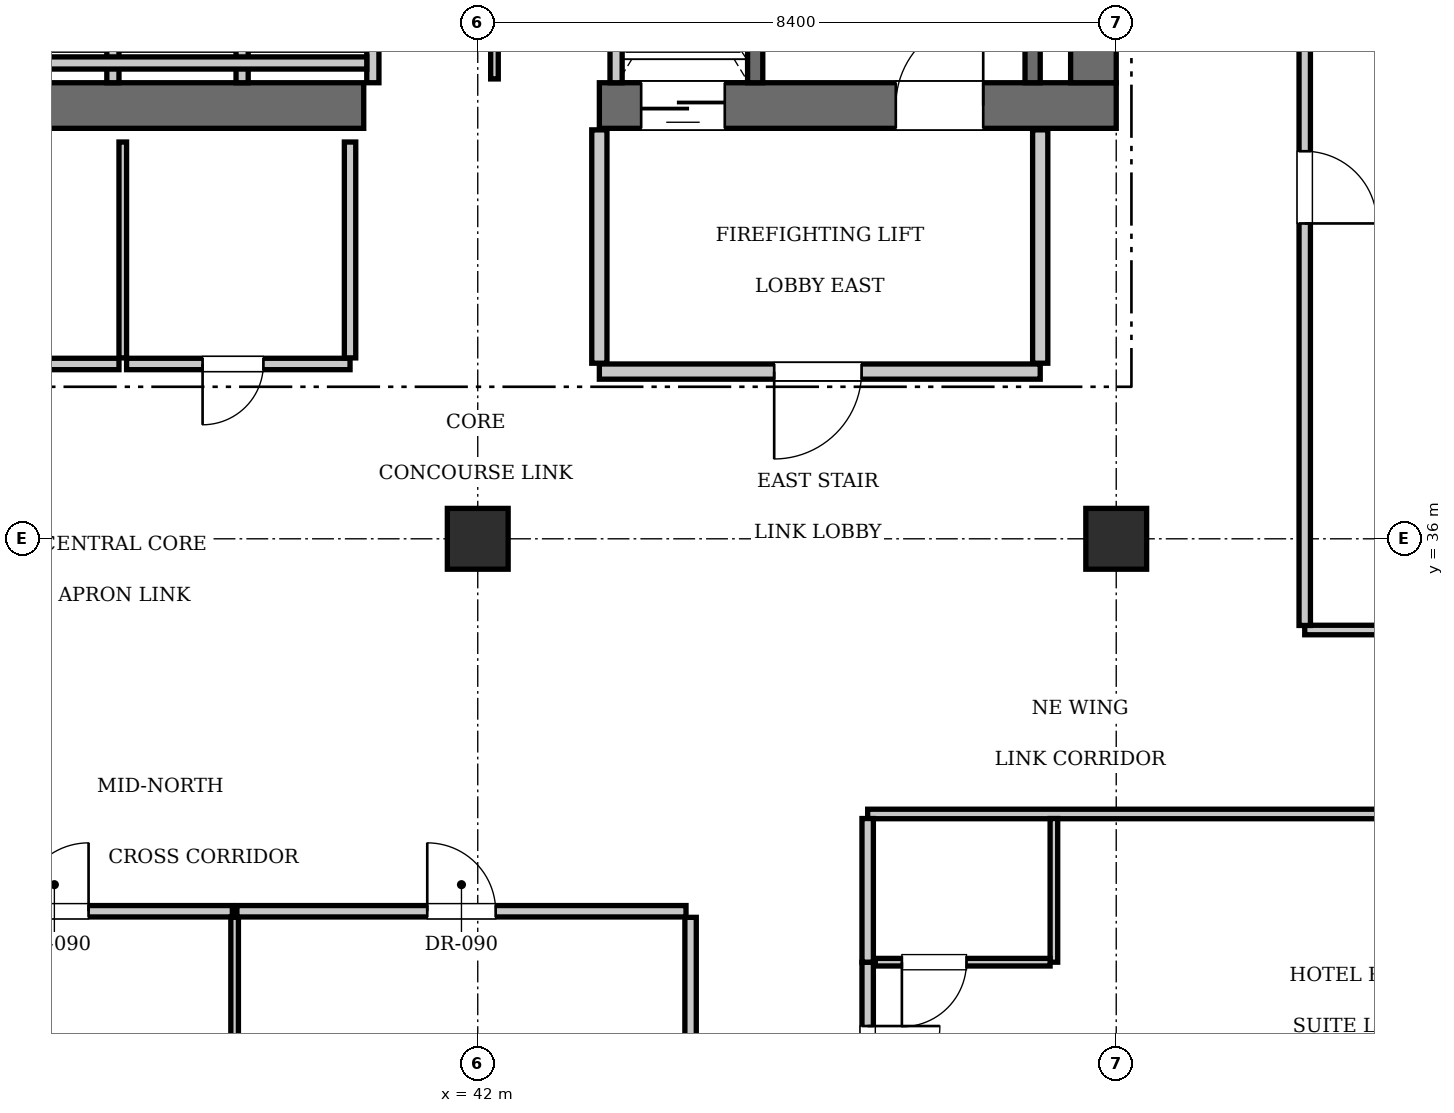
"""IFC4 building model, lengths in metres.
Left out: names, types, materials, properties, quantities, classifications, styles, units other than length and angle.
Written with IfcOpenShell. Run it as: python <this file> out.ifc"""

import sys

from ifc_helpers import new_model, si_unit, direction, frame, frame_2d, origin, origin_2d, place, context, subcontext, project, spatial, rectangle, extrude, element, fill, save


model = new_model("IFC4")
c1 = context("Model", 3, precision=1e-05, world=origin(), true_north=direction((0.0, 1.0)))
c2 = subcontext(c1, "Body", "Model", "MODEL_VIEW")
j1 = project(units=[si_unit("LENGTHUNIT", "METRE"), si_unit("PLANEANGLEUNIT", "RADIAN")], contexts=[c1])
p1 = place(None, origin())
s1 = spatial("IfcSite", under=j1, at=p1, CompositionType="ELEMENT")
p2 = place(p1, origin())
s2 = spatial("IfcBuilding", under=s1, at=p2, CompositionType="ELEMENT")
p3 = place(p2, frame((0.0, 0.0, 277.9)))
s3 = spatial("IfcBuildingStorey", under=s2, at=p3, CompositionType="ELEMENT", Elevation=277.9)
p4 = place(p3, frame((35.1, 41.7, 0.0), z_axis=(0.0, 0.0, 1.0), x_axis=(1.0, 0.0, 0.0)))
e1 = element("IfcWall", 1, at=p4, inside=s3, PredefinedType="SHEAR", context=c2, shape_type="SweptSolid", body=[
    extrude(rectangle(XDim=5.4, YDim=0.6, at=frame_2d((2.7, 0.0))), origin(), (0.0, 0.0, 1.0), 3.85),
])
p5 = place(p3, frame((43.6, 41.7, 0.0), z_axis=(0.0, 0.0, 1.0), x_axis=(1.0, 0.0, 0.0)))
e2 = element("IfcWall", 2, at=p5, inside=s3, PredefinedType="SHEAR", context=c2, shape_type="SweptSolid", body=[
    extrude(rectangle(XDim=6.8, YDim=0.6, at=frame_2d((3.4, 0.0))), origin(), (0.0, 0.0, 1.0), 3.85),
])
p6 = place(p5, frame((3.9, 0.0, 0.0)))
e3 = element("IfcOpeningElement", 3, at=p6, cuts=e2, PredefinedType="OPENING", context=c2, shape_type="SweptSolid", body=[
    extrude(rectangle(XDim=1.15, YDim=2.15, at=frame_2d((0.575, 1.075))), frame((0.0, 0.31, 0.0), z_axis=(0.0, -1.0, 0.0), x_axis=(1.0, 0.0, 0.0)), (0.0, 0.0, 1.0), 0.62),
])
p7 = place(p5, frame((0.55, 0.0, 0.0)))
e4 = element("IfcOpeningElement", 4, at=p7, cuts=e2, PredefinedType="OPENING", context=c2, shape_type="SweptSolid", body=[
    extrude(rectangle(XDim=1.1, YDim=2.2, at=frame_2d((0.55, 1.1))), frame((0.0, 0.31, 0.0), z_axis=(0.0, -1.0, 0.0), x_axis=(1.0, 0.0, 0.0)), (0.0, 0.0, 1.0), 0.62),
])
p8 = place(p3, frame((50.1, 42.0, 0.0), z_axis=(0.0, 0.0, 1.0), x_axis=(0.0, 1.0, 0.0)))
e5 = element("IfcWall", 5, at=p8, inside=s3, PredefinedType="SHEAR", context=c2, shape_type="SweptSolid", body=[
    extrude(rectangle(XDim=2.2, YDim=0.6, at=frame_2d((1.1, 0.0))), origin(), (0.0, 0.0, 1.0), 3.85),
])
for number, where, z_axis, x_axis in (
    (6, (42.0, 36.0, 0.0), (0.0, 0.0, 1.0), (1.0, 0.0, 0.0)),
    (7, (50.4, 36.0, 0.0), (0.0, 0.0, 1.0), (1.0, 0.0, 0.0)),
):
    element("IfcColumn", number, at=place(p3, frame(where, z_axis=z_axis, x_axis=x_axis)), inside=s3, PredefinedType="COLUMN", context=c2, shape_type="SweptSolid", body=[
        extrude(rectangle(XDim=0.8, YDim=0.8, at=origin_2d()), origin(), (0.0, 0.0, 1.0), 3.85),
    ])
p9 = place(p3, frame((45.65, 42.0, 0.0), z_axis=(0.0, 0.0, 1.0), x_axis=(0.0, 1.0, 0.0)))
e8 = element("IfcWall", 8, at=p9, inside=s3, PredefinedType="SOLIDWALL", context=c2, shape_type="SweptSolid", body=[
    extrude(rectangle(XDim=9.15, YDim=0.2, at=frame_2d((4.575, 0.0))), origin(), (0.0, 0.0, 1.0), 3.61),
])
p10 = place(p3, frame((49.3, 42.0, 0.0), z_axis=(0.0, 0.0, 1.0), x_axis=(0.0, 1.0, 0.0)))
e9 = element("IfcWall", 9, at=p10, inside=s3, PredefinedType="SOLIDWALL", context=c2, shape_type="SweptSolid", body=[
    extrude(rectangle(XDim=9.12, YDim=0.2, at=frame_2d((4.56, 0.0))), origin(), (0.0, 0.0, 1.0), 3.61),
])
p11 = place(p3, frame((43.82, 42.0, 0.0), z_axis=(0.0, 0.0, 1.0), x_axis=(0.0, 1.0, 0.0)))
e10 = element("IfcWall", 10, at=p11, inside=s3, PredefinedType="SOLIDWALL", context=c2, shape_type="SweptSolid", body=[
    extrude(rectangle(XDim=2.74, YDim=0.16, at=frame_2d((1.37, 0.0))), origin(), (0.0, 0.0, 1.0), 3.61),
])
for number, where, z_axis, x_axis in (
    (11, (37.2, 42.0, 0.0), (0.0, 0.0, 1.0), (0.0, 1.0, 0.0)),
    (12, (38.9, 42.0, 0.0), (0.0, 0.0, 1.0), (0.0, 1.0, 0.0)),
    (13, (40.62, 42.0, 0.0), (0.0, 0.0, 1.0), (0.0, 1.0, 0.0)),
):
    element("IfcWall", number, at=place(p3, frame(where, z_axis=z_axis, x_axis=x_axis)), inside=s3, PredefinedType="SOLIDWALL", context=c2, shape_type="SweptSolid", body=[
        extrude(rectangle(XDim=2.35, YDim=0.16, at=frame_2d((1.175, 0.0))), origin(), (0.0, 0.0, 1.0), 3.61),
    ])
p12 = place(p3, frame((35.52, 42.26, 0.0), z_axis=(0.0, 0.0, 1.0), x_axis=(1.0, 0.0, 0.0)))
e14 = element("IfcWall", 14, at=p12, inside=s3, PredefinedType="SOLIDWALL", context=c2, shape_type="SweptSolid", body=[
    extrude(rectangle(XDim=5.02, YDim=0.16, at=frame_2d((2.51, 0.0))), origin(), (0.0, 0.0, 1.0), 3.61),
])
p13 = place(p3, frame((43.6, 38.2, 0.0), z_axis=(0.0, 0.0, 1.0), x_axis=(1.0, 0.0, 0.0)))
e15 = element("IfcWall", 15, at=p13, inside=s3, PredefinedType="PARTITIONING", context=c2, shape_type="SweptSolid", body=[
    extrude(rectangle(XDim=5.8, YDim=0.2, at=frame_2d((2.9, 0.0))), origin(), (0.0, 0.0, 1.0), 3.61),
])
p14 = place(p13, frame((2.3, 0.0, 0.0)))
e16 = element("IfcOpeningElement", 16, at=p14, cuts=e15, PredefinedType="OPENING", context=c2, shape_type="SweptSolid", body=[
    extrude(rectangle(XDim=1.15, YDim=2.15, at=frame_2d((0.575, 1.075))), frame((0.0, 0.11, 0.0), z_axis=(0.0, -1.0, 0.0), x_axis=(1.0, 0.0, 0.0)), (0.0, 0.0, 1.0), 0.22),
])
for number, where, z_axis, x_axis in (
    (17, (43.6, 38.31, 0.0), (0.0, 0.0, 1.0), (0.0, 1.0, 0.0)),
    (18, (49.4, 38.31, 0.0), (0.0, 0.0, 1.0), (0.0, 1.0, 0.0)),
):
    element("IfcWall", number, at=place(p3, frame(where, z_axis=z_axis, x_axis=x_axis)), inside=s3, PredefinedType="PARTITIONING", context=c2, shape_type="SweptSolid", body=[
        extrude(rectangle(XDim=3.07, YDim=0.2, at=frame_2d((1.535, 0.0))), origin(), (0.0, 0.0, 1.0), 3.61),
    ])
p15 = place(p3, frame((42.22, 42.05, 0.0), z_axis=(0.0, 0.0, 1.0), x_axis=(0.0, 1.0, 0.0)))
e19 = element("IfcWall", 19, at=p15, inside=s3, PredefinedType="PARTITIONING", context=c2, shape_type="SweptSolid", body=[
    extrude(rectangle(XDim=2.91, YDim=0.1, at=frame_2d((1.455, 0.0))), origin(), (0.0, 0.0, 1.0), 3.61),
])
p16 = place(p15, frame((0.65, 0.0, 0.0)))
e20 = element("IfcOpeningElement", 20, at=p16, cuts=e19, PredefinedType="OPENING", context=c2, shape_type="SweptSolid", body=[
    extrude(rectangle(XDim=0.8, YDim=2.05, at=frame_2d((0.4, 1.025))), frame((0.0, 0.06, 0.0), z_axis=(0.0, -1.0, 0.0), x_axis=(1.0, 0.0, 0.0)), (0.0, 0.0, 1.0), 0.12),
])
p17 = place(p3, frame((34.4, 38.3, 0.0), z_axis=(0.0, 0.0, 1.0), x_axis=(1.0, 0.0, 0.0)))
e21 = element("IfcWall", 21, at=p17, inside=s3, PredefinedType="PARTITIONING", context=c2, shape_type="SweptSolid", body=[
    extrude(rectangle(XDim=2.88, YDim=0.15, at=frame_2d((1.44, 0.0))), origin(), (0.0, 0.0, 1.0), 3.61),
])
p18 = place(p17, frame((1.0, 0.0, 0.0)))
e22 = element("IfcOpeningElement", 22, at=p18, cuts=e21, PredefinedType="OPENING", context=c2, shape_type="SweptSolid", body=[
    extrude(rectangle(XDim=0.8, YDim=2.05, at=frame_2d((0.4, 1.025))), frame((0.0, 0.085, 0.0), z_axis=(0.0, -1.0, 0.0), x_axis=(1.0, 0.0, 0.0)), (0.0, 0.0, 1.0), 0.17),
])
p19 = place(p3, frame((37.38, 38.3, 0.0), z_axis=(0.0, 0.0, 1.0), x_axis=(1.0, 0.0, 0.0)))
e23 = element("IfcWall", 23, at=p19, inside=s3, PredefinedType="PARTITIONING", context=c2, shape_type="SweptSolid", body=[
    extrude(rectangle(XDim=2.94, YDim=0.15, at=frame_2d((1.47, 0.0))), origin(), (0.0, 0.0, 1.0), 3.61),
])
p20 = place(p19, frame((1.0, 0.0, 0.0)))
e24 = element("IfcOpeningElement", 24, at=p20, cuts=e23, PredefinedType="OPENING", context=c2, shape_type="SweptSolid", body=[
    extrude(rectangle(XDim=0.8, YDim=2.05, at=frame_2d((0.4, 1.025))), frame((0.0, 0.085, 0.0), z_axis=(0.0, -1.0, 0.0), x_axis=(1.0, 0.0, 0.0)), (0.0, 0.0, 1.0), 0.17),
])
p21 = place(p3, frame((37.33, 38.38, 0.0), z_axis=(0.0, 0.0, 1.0), x_axis=(0.0, 1.0, 0.0)))
e25 = element("IfcWall", 25, at=p21, inside=s3, PredefinedType="PARTITIONING", context=c2, shape_type="SweptSolid", body=[
    extrude(rectangle(XDim=2.84, YDim=0.1, at=frame_2d((1.42, 0.0))), origin(), (0.0, 0.0, 1.0), 3.61),
])
p22 = place(p3, frame((40.32, 38.38, 0.0), z_axis=(0.0, 0.0, 1.0), x_axis=(0.0, 1.0, 0.0)))
e26 = element("IfcWall", 26, at=p22, inside=s3, PredefinedType="PARTITIONING", context=c2, shape_type="SweptSolid", body=[
    extrude(rectangle(XDim=2.84, YDim=0.15, at=frame_2d((1.42, 0.0))), origin(), (0.0, 0.0, 1.0), 3.61),
])
p23 = place(p3, frame((44.8, 23.13, 0.0), z_axis=(0.0, 0.0, 1.0), x_axis=(0.0, 1.0, 0.0)))
e27 = element("IfcWall", 27, at=p23, inside=s3, PredefinedType="PARTITIONING", context=c2, shape_type="SweptSolid", body=[
    extrude(rectangle(XDim=7.89, YDim=0.15, at=frame_2d((3.945, 0.0))), origin(), (0.0, 0.0, 1.0), 3.61),
])
p24 = place(p3, frame((34.088, 31.1, 0.0), z_axis=(0.0, 0.0, 1.0), x_axis=(1.0, 0.0, 0.0)))
e28 = element("IfcWall", 28, at=p24, inside=s3, PredefinedType="PARTITIONING", context=c2, shape_type="SweptSolid", body=[
    extrude(rectangle(XDim=4.683, YDim=0.15, at=frame_2d((2.342, 0.0))), origin(), (0.0, 0.0, 1.0), 3.61),
])
p25 = place(p24, frame((1.892, 0.0, 0.0)))
e29 = element("IfcOpeningElement", 29, at=p25, cuts=e28, PredefinedType="OPENING", context=c2, shape_type="SweptSolid", body=[
    extrude(rectangle(XDim=0.9, YDim=2.1, at=frame_2d((0.45, 1.05))), frame((0.0, 0.085, 0.0), z_axis=(0.0, -1.0, 0.0), x_axis=(1.0, 0.0, 0.0)), (0.0, 0.0, 1.0), 0.17),
])
p26 = place(p3, frame((38.802, 23.13, 0.0), z_axis=(0.0, 0.0, 1.0), x_axis=(0.0, 1.0, 0.0)))
e30 = element("IfcWall", 30, at=p26, inside=s3, PredefinedType="PARTITIONING", context=c2, shape_type="SweptSolid", body=[
    extrude(rectangle(XDim=7.89, YDim=0.1, at=frame_2d((3.945, 0.0))), origin(), (0.0, 0.0, 1.0), 3.61),
])
p27 = place(p3, frame((38.832, 31.1, 0.0), z_axis=(0.0, 0.0, 1.0), x_axis=(1.0, 0.0, 0.0)))
e31 = element("IfcWall", 31, at=p27, inside=s3, PredefinedType="PARTITIONING", context=c2, shape_type="SweptSolid", body=[
    extrude(rectangle(XDim=5.908, YDim=0.15, at=frame_2d((2.954, 0.0))), origin(), (0.0, 0.0, 1.0), 3.61),
])
p28 = place(p27, frame((2.504, 0.0, 0.0)))
e32 = element("IfcOpeningElement", 32, at=p28, cuts=e31, PredefinedType="OPENING", context=c2, shape_type="SweptSolid", body=[
    extrude(rectangle(XDim=0.9, YDim=2.1, at=frame_2d((0.45, 1.05))), frame((0.0, 0.085, 0.0), z_axis=(0.0, -1.0, 0.0), x_axis=(1.0, 0.0, 0.0)), (0.0, 0.0, 1.0), 0.17),
])
p29 = place(p3, frame((47.13, 32.38, 0.0), z_axis=(0.0, 0.0, 1.0), x_axis=(1.0, 0.0, 0.0)))
e33 = element("IfcWall", 33, at=p29, inside=s3, PredefinedType="PARTITIONING", context=c2, shape_type="SweptSolid", body=[
    extrude(rectangle(XDim=12.97, YDim=0.125, at=frame_2d((6.485, 0.0))), origin(), (0.0, 0.0, 1.0), 3.61),
])
p30 = place(p3, frame((47.13, 27.8, 0.0), z_axis=(0.0, 0.0, 1.0), x_axis=(0.0, 1.0, 0.0)))
e34 = element("IfcWall", 34, at=p30, inside=s3, PredefinedType="PARTITIONING", context=c2, shape_type="SweptSolid", body=[
    extrude(rectangle(XDim=2.63, YDim=0.15, at=frame_2d((1.315, 0.0))), origin(), (0.0, 0.0, 1.0), 3.61),
])
p31 = place(p30, frame((0.84, 0.0, 0.0)))
e35 = element("IfcOpeningElement", 35, at=p31, cuts=e34, PredefinedType="OPENING", context=c2, shape_type="SweptSolid", body=[
    extrude(rectangle(XDim=0.95, YDim=2.15, at=frame_2d((0.475, 1.075))), frame((0.0, 0.085, 0.0), z_axis=(0.0, -1.0, 0.0), x_axis=(1.0, 0.0, 0.0)), (0.0, 0.0, 1.0), 0.17),
])
p32 = place(p3, frame((47.13, 30.43, 0.0), z_axis=(0.0, 0.0, 1.0), x_axis=(0.0, 1.0, 0.0)))
e36 = element("IfcWall", 36, at=p32, inside=s3, PredefinedType="PARTITIONING", context=c2, shape_type="SweptSolid", body=[
    extrude(rectangle(XDim=1.89, YDim=0.15, at=frame_2d((0.945, 0.0))), origin(), (0.0, 0.0, 1.0), 3.61),
])
p33 = place(p3, frame((49.58, 30.43, 0.0), z_axis=(0.0, 0.0, 1.0), x_axis=(0.0, 1.0, 0.0)))
e37 = element("IfcWall", 37, at=p33, inside=s3, PredefinedType="PARTITIONING", context=c2, shape_type="SweptSolid", body=[
    extrude(rectangle(XDim=1.89, YDim=0.1, at=frame_2d((0.945, 0.0))), origin(), (0.0, 0.0, 1.0), 3.61),
])
p34 = place(p3, frame((47.23, 30.43, 0.0), z_axis=(0.0, 0.0, 1.0), x_axis=(1.0, 0.0, 0.0)))
e38 = element("IfcWall", 38, at=p34, inside=s3, PredefinedType="PARTITIONING", context=c2, shape_type="SweptSolid", body=[
    extrude(rectangle(XDim=2.3, YDim=0.1, at=frame_2d((1.15, 0.0))), origin(), (0.0, 0.0, 1.0), 3.61),
])
p35 = place(p34, frame((0.35, 0.0, 0.0)))
e39 = element("IfcOpeningElement", 39, at=p35, cuts=e38, PredefinedType="OPENING", context=c2, shape_type="SweptSolid", body=[
    extrude(rectangle(XDim=0.85, YDim=2.1, at=frame_2d((0.425, 1.05))), frame((0.0, 0.06, 0.0), z_axis=(0.0, -1.0, 0.0), x_axis=(1.0, 0.0, 0.0)), (0.0, 0.0, 1.0), 0.12),
])
p36 = place(p3, frame((52.88, 34.8, 0.0), z_axis=(0.0, 0.0, 1.0), x_axis=(1.0, 0.0, 0.0)))
e40 = element("IfcWall", 40, at=p36, inside=s3, PredefinedType="PARTITIONING", context=c2, shape_type="SweptSolid", body=[
    extrude(rectangle(XDim=7.22, YDim=0.125, at=frame_2d((3.61, 0.0))), origin(), (0.0, 0.0, 1.0), 3.61),
])
p37 = place(p3, frame((52.88, 34.86, 0.0), z_axis=(0.0, 0.0, 1.0), x_axis=(0.0, 1.0, 0.0)))
e41 = element("IfcWall", 41, at=p37, inside=s3, PredefinedType="PARTITIONING", context=c2, shape_type="SweptSolid", body=[
    extrude(rectangle(XDim=11.527, YDim=0.15, at=frame_2d((5.764, 0.0))), origin(), (0.0, 0.0, 1.0), 3.61),
])
p38 = place(p37, frame((5.289, 0.0, 0.0)))
e42 = element("IfcOpeningElement", 42, at=p38, cuts=e41, PredefinedType="OPENING", context=c2, shape_type="SweptSolid", body=[
    extrude(rectangle(XDim=0.95, YDim=2.15, at=frame_2d((0.475, 1.075))), frame((0.0, 0.085, 0.0), z_axis=(0.0, -1.0, 0.0), x_axis=(1.0, 0.0, 0.0)), (0.0, 0.0, 1.0), 0.17),
])
p39 = place(p6, origin())
e43 = element("IfcDoor", 43, at=p39, inside=s3, OperationType="SINGLE_SWING_RIGHT", PredefinedType="DOOR", context=c2, shape_type="SweptSolid", body=[
    extrude(rectangle(XDim=1.15, YDim=2.15, at=frame_2d((0.575, 1.075))), frame((0.0, 0.025, 0.0), z_axis=(0.0, -1.0, 0.0), x_axis=(1.0, 0.0, 0.0)), (0.0, 0.0, 1.0), 0.05),
])
fill(e3, e43)
p40 = place(p7, frame((1.1, 0.0, 0.0), z_axis=(0.0, 0.0, 1.0), x_axis=(-1.0, 0.0, 0.0)))
e44 = element("IfcDoor", 44, at=p40, inside=s3, OperationType="SLIDING_TO_LEFT", PredefinedType="DOOR", context=c2, shape_type="SweptSolid", body=[
    extrude(rectangle(XDim=1.1, YDim=2.2, at=frame_2d((0.55, 1.1))), frame((0.0, 0.025, 0.0), z_axis=(0.0, -1.0, 0.0), x_axis=(1.0, 0.0, 0.0)), (0.0, 0.0, 1.0), 0.05),
])
fill(e4, e44)
p41 = place(p14, frame((1.15, 0.0, 0.0), z_axis=(0.0, 0.0, 1.0), x_axis=(-1.0, 0.0, 0.0)))
e45 = element("IfcDoor", 45, at=p41, inside=s3, OperationType="SINGLE_SWING_RIGHT", PredefinedType="DOOR", context=c2, shape_type="SweptSolid", body=[
    extrude(rectangle(XDim=1.15, YDim=2.15, at=frame_2d((0.575, 1.075))), frame((0.0, 0.025, 0.0), z_axis=(0.0, -1.0, 0.0), x_axis=(1.0, 0.0, 0.0)), (0.0, 0.0, 1.0), 0.05),
])
fill(e16, e45)
p42 = place(p20, frame((0.8, 0.0, 0.0), z_axis=(0.0, 0.0, 1.0), x_axis=(-1.0, 0.0, 0.0)))
e46 = element("IfcDoor", 46, at=p42, inside=s3, OperationType="SINGLE_SWING_RIGHT", PredefinedType="DOOR", context=c2, shape_type="SweptSolid", body=[
    extrude(rectangle(XDim=0.8, YDim=2.05, at=frame_2d((0.4, 1.025))), frame((0.0, 0.025, 0.0), z_axis=(0.0, -1.0, 0.0), x_axis=(1.0, 0.0, 0.0)), (0.0, 0.0, 1.0), 0.05),
])
fill(e24, e46)
p43 = place(p25, origin())
e47 = element("IfcDoor", 47, at=p43, inside=s3, OperationType="SINGLE_SWING_RIGHT", PredefinedType="DOOR", context=c2, shape_type="SweptSolid", body=[
    extrude(rectangle(XDim=0.9, YDim=2.1, at=frame_2d((0.45, 1.05))), frame((0.0, 0.025, 0.0), z_axis=(0.0, -1.0, 0.0), x_axis=(1.0, 0.0, 0.0)), (0.0, 0.0, 1.0), 0.05),
])
fill(e29, e47)
p44 = place(p28, origin())
e48 = element("IfcDoor", 48, at=p44, inside=s3, OperationType="SINGLE_SWING_LEFT", PredefinedType="DOOR", context=c2, shape_type="SweptSolid", body=[
    extrude(rectangle(XDim=0.9, YDim=2.1, at=frame_2d((0.45, 1.05))), frame((0.0, 0.025, 0.0), z_axis=(0.0, -1.0, 0.0), x_axis=(1.0, 0.0, 0.0)), (0.0, 0.0, 1.0), 0.05),
])
fill(e32, e48)
p45 = place(p35, frame((0.85, 0.0, 0.0), z_axis=(0.0, 0.0, 1.0), x_axis=(-1.0, 0.0, 0.0)))
e49 = element("IfcDoor", 49, at=p45, inside=s3, OperationType="SINGLE_SWING_RIGHT", PredefinedType="DOOR", context=c2, shape_type="SweptSolid", body=[
    extrude(rectangle(XDim=0.85, YDim=2.1, at=frame_2d((0.425, 1.05))), frame((0.0, 0.025, 0.0), z_axis=(0.0, -1.0, 0.0), x_axis=(1.0, 0.0, 0.0)), (0.0, 0.0, 1.0), 0.05),
])
fill(e39, e49)
p46 = place(p31, frame((0.95, 0.0, 0.0), z_axis=(0.0, 0.0, 1.0), x_axis=(-1.0, 0.0, 0.0)))
e50 = element("IfcDoor", 50, at=p46, inside=s3, OperationType="SINGLE_SWING_LEFT", PredefinedType="DOOR", context=c2, shape_type="SweptSolid", body=[
    extrude(rectangle(XDim=0.95, YDim=2.15, at=frame_2d((0.475, 1.075))), frame((0.0, 0.025, 0.0), z_axis=(0.0, -1.0, 0.0), x_axis=(1.0, 0.0, 0.0)), (0.0, 0.0, 1.0), 0.05),
])
fill(e35, e50)
p47 = place(p38, frame((0.95, 0.0, 0.0), z_axis=(0.0, 0.0, 1.0), x_axis=(-1.0, 0.0, 0.0)))
e51 = element("IfcDoor", 51, at=p47, inside=s3, OperationType="SINGLE_SWING_RIGHT", PredefinedType="DOOR", context=c2, shape_type="SweptSolid", body=[
    extrude(rectangle(XDim=0.95, YDim=2.15, at=frame_2d((0.475, 1.075))), frame((0.0, 0.025, 0.0), z_axis=(0.0, -1.0, 0.0), x_axis=(1.0, 0.0, 0.0)), (0.0, 0.0, 1.0), 0.05),
])
fill(e42, e51)
save(model, sys.argv[1])
